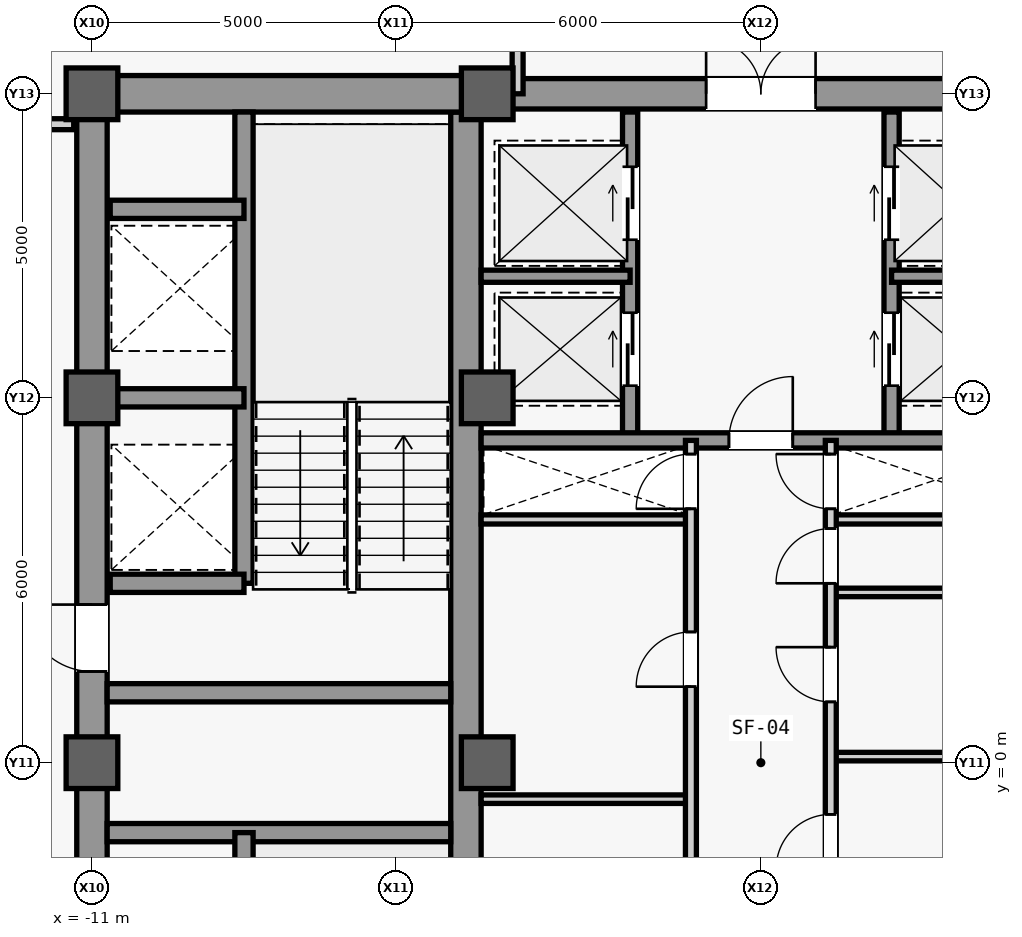
"""IFC4 building model, lengths in metres.
Left out: names, types, materials, properties, quantities, classifications, styles, units other than length and angle.
Written with IfcOpenShell. Run it as: python <this file> out.ifc"""

import sys

from ifc_helpers import new_model, si_unit, direction, frame, frame_2d, origin, origin_2d, place, context, subcontext, project, spatial, rectangle, extrude, source, transform, mapped, element, fill, save


model = new_model("IFC4")
c1 = context("Model", 3, precision=1e-05, world=origin(), true_north=direction((0.0, 1.0)))
c2 = subcontext(c1, "Body", "Model", "MODEL_VIEW")
j1 = project(units=[si_unit("LENGTHUNIT", "METRE"), si_unit("PLANEANGLEUNIT", "RADIAN")], contexts=[c1])
p1 = place(None, origin())
s1 = spatial("IfcSite", under=j1, at=p1, CompositionType="ELEMENT")
p2 = place(p1, origin())
s2 = spatial("IfcBuilding", under=s1, at=p2, CompositionType="ELEMENT")
p3 = place(p2, frame((0.0, 0.0, 247.1)))
s3 = spatial("IfcBuildingStorey", under=s2, at=p3, CompositionType="ELEMENT", Elevation=247.1)
m1 = source(origin(), c2, "Body", "SweptSolid", [
    extrude(rectangle(XDim=22.0, YDim=0.5, at=frame_2d((11.0, 0.0))), origin(), (0.0, 0.0, 1.0), 3.78),
])
p4 = place(p3, frame((-11.0, -11.0, 0.0), z_axis=(0.0, 0.0, 1.0), x_axis=(0.0, 1.0, 0.0)))
e1 = element("IfcWall", 1, at=p4, inside=s3, PredefinedType="SHEAR", context=c2, shape_type="MappedRepresentation", body=[
    mapped(m1, transform((0.0, 0.0, 0.0), scale=1.0)),
])
m2 = source(origin(), c2, "Body", "SweptSolid", [
    extrude(rectangle(XDim=1.1, YDim=2.2, at=frame_2d((0.55, 1.1))), frame((0.0, 0.26, 0.0), z_axis=(0.0, -1.0, 0.0), x_axis=(1.0, 0.0, 0.0)), (0.0, 0.0, 1.0), 0.52),
])
p5 = place(p4, frame((0.8, 0.0, 0.0)))
e2 = element("IfcOpeningElement", 2, at=p5, cuts=e1, PredefinedType="OPENING", context=c2, shape_type="MappedRepresentation", body=[
    mapped(m2, transform((0.0, 0.0, 0.0), scale=1.0)),
])
p6 = place(p4, frame((12.5, 0.0, 0.0)))
e3 = element("IfcOpeningElement", 3, at=p6, cuts=e1, PredefinedType="OPENING", context=c2, shape_type="MappedRepresentation", body=[
    mapped(m2, transform((0.0, 0.0, 0.0), scale=1.0)),
])
m3 = source(origin(), c2, "Body", "SweptSolid", [
    extrude(rectangle(XDim=0.9, YDim=2.15, at=frame_2d((0.45, 1.075))), frame((0.0, 0.26, 0.0), z_axis=(0.0, -1.0, 0.0), x_axis=(1.0, 0.0, 0.0)), (0.0, 0.0, 1.0), 0.52),
])
p7 = place(p4, frame((7.575, 0.0, 0.0)))
e4 = element("IfcOpeningElement", 4, at=p7, cuts=e1, PredefinedType="OPENING", context=c2, shape_type="MappedRepresentation", body=[
    mapped(m3, transform((0.0, 0.0, 0.0), scale=1.0)),
])
m4 = source(origin(), c2, "Body", "SweptSolid", [
    extrude(rectangle(XDim=1.3, YDim=2.3, at=frame_2d((0.65, 1.15))), frame((0.0, 0.26, 0.0), z_axis=(0.0, -1.0, 0.0), x_axis=(1.0, 0.0, 0.0)), (0.0, 0.0, 1.0), 0.52),
])
p8 = place(p4, frame((2.7, 0.0, 0.0)))
e5 = element("IfcOpeningElement", 5, at=p8, cuts=e1, PredefinedType="OPENING", context=c2, shape_type="MappedRepresentation", body=[
    mapped(m4, transform((0.0, 0.0, 0.0), scale=1.0)),
])
m5 = source(origin(), c2, "Body", "SweptSolid", [
    extrude(rectangle(XDim=21.4, YDim=0.5, at=frame_2d((10.7, 0.0))), origin(), (0.0, 0.0, 1.0), 3.78),
])
p9 = place(p3, frame((-4.85, -10.7, 0.0), z_axis=(0.0, 0.0, 1.0), x_axis=(0.0, 1.0, 0.0)))
e6 = element("IfcWall", 6, at=p9, inside=s3, PredefinedType="SHEAR", context=c2, shape_type="MappedRepresentation", body=[
    mapped(m5, transform((0.0, 0.0, 0.0), scale=1.0)),
])
m6 = source(origin(), c2, "Body", "SweptSolid", [
    extrude(rectangle(XDim=5.9, YDim=0.6, at=frame_2d((2.95, 0.0))), origin(), (0.0, 0.0, 1.0), 3.78),
])
p10 = place(p3, frame((-10.75, 11.0, 0.0), z_axis=(0.0, 0.0, 1.0), x_axis=(1.0, 0.0, 0.0)))
e7 = element("IfcWall", 7, at=p10, inside=s3, PredefinedType="SHEAR", context=c2, shape_type="MappedRepresentation", body=[
    mapped(m6, transform((0.0, 0.0, 0.0), scale=1.0)),
])
m7 = source(origin(), c2, "Body", "SweptSolid", [
    extrude(rectangle(XDim=5.65, YDim=0.3, at=frame_2d((2.825, 0.0))), origin(), (0.0, 0.0, 1.0), 3.78),
])
for number, where, z_axis, x_axis in (
    (8, (-10.75, -1.15, 0.0), (0.0, 0.0, 1.0), (1.0, 0.0, 0.0)),
    (9, (-10.75, 1.15, 0.0), (0.0, 0.0, 1.0), (1.0, 0.0, 0.0)),
):
    element("IfcWall", number, at=place(p3, frame(where, z_axis=z_axis, x_axis=x_axis)), inside=s3, PredefinedType="SHEAR", context=c2, shape_type="MappedRepresentation", body=[
        mapped(m7, transform((0.0, 0.0, 0.0), scale=1.0)),
    ])
m8 = source(origin(), c2, "Body", "SweptSolid", [
    extrude(rectangle(XDim=9.2, YDim=0.5, at=frame_2d((4.6, 0.0))), origin(), (0.0, 0.0, 1.0), 3.78),
])
p11 = place(p3, frame((-4.6, 11.0, 0.0), z_axis=(0.0, 0.0, 1.0), x_axis=(1.0, 0.0, 0.0)))
e10 = element("IfcWall", 10, at=p11, inside=s3, PredefinedType="SHEAR", context=c2, shape_type="MappedRepresentation", body=[
    mapped(m8, transform((0.0, 0.0, 0.0), scale=1.0)),
])
m9 = source(origin(), c2, "Body", "SweptSolid", [
    extrude(rectangle(XDim=1.8, YDim=2.25, at=frame_2d((0.9, 1.125))), frame((0.0, 0.26, 0.0), z_axis=(0.0, -1.0, 0.0), x_axis=(1.0, 0.0, 0.0)), (0.0, 0.0, 1.0), 0.52),
])
p12 = place(p11, frame((3.7, 0.0, 0.0)))
e11 = element("IfcOpeningElement", 11, at=p12, cuts=e10, PredefinedType="OPENING", context=c2, shape_type="MappedRepresentation", body=[
    mapped(m9, transform((0.0, 0.0, 0.0), scale=1.0)),
])
m10 = source(origin(), c2, "Body", "SweptSolid", [
    extrude(rectangle(XDim=0.85, YDim=0.85, at=origin_2d()), origin(), (0.0, 0.0, 1.0), 4.0),
])
for number, where, z_axis, x_axis in (
    (12, (-11.0, 0.0, 0.0), (0.0, 0.0, 1.0), (1.0, 0.0, 0.0)),
    (13, (-11.0, 6.0, 0.0), (0.0, 0.0, 1.0), (1.0, 0.0, 0.0)),
    (14, (-11.0, 11.0, 0.0), (0.0, 0.0, 1.0), (1.0, 0.0, 0.0)),
    (15, (-4.5, 0.0, 0.0), (0.0, 0.0, 1.0), (1.0, 0.0, 0.0)),
    (16, (-4.5, 6.0, 0.0), (0.0, 0.0, 1.0), (1.0, 0.0, 0.0)),
    (17, (-4.5, 11.0, 0.0), (0.0, 0.0, 1.0), (1.0, 0.0, 0.0)),
):
    element("IfcColumn", number, at=place(p3, frame(where, z_axis=z_axis, x_axis=x_axis)), inside=s3, PredefinedType="COLUMN", context=c2, shape_type="MappedRepresentation", body=[
        mapped(m10, transform((0.0, 0.0, 0.0), scale=1.0)),
    ])
m11 = source(origin(), c2, "Body", "SweptSolid", [
    extrude(rectangle(XDim=7.8, YDim=0.3, at=frame_2d((3.9, 0.0))), origin(), (0.0, 0.0, 1.0), 3.78),
])
p13 = place(p3, frame((-8.5, -8.95, 0.0), z_axis=(0.0, 0.0, 1.0), x_axis=(0.0, 1.0, 0.0)))
e18 = element("IfcWall", 18, at=p13, inside=s3, PredefinedType="SHEAR", context=c2, shape_type="MappedRepresentation", body=[
    mapped(m11, transform((0.0, 0.0, 0.0), scale=1.0)),
])
m12 = source(origin(), c2, "Body", "SweptSolid", [
    extrude(rectangle(XDim=7.75, YDim=0.3, at=frame_2d((3.875, 0.0))), origin(), (0.0, 0.0, 1.0), 3.78),
])
p14 = place(p3, frame((-8.5, 2.95, 0.0), z_axis=(0.0, 0.0, 1.0), x_axis=(0.0, 1.0, 0.0)))
e19 = element("IfcWall", 19, at=p14, inside=s3, PredefinedType="SHEAR", context=c2, shape_type="MappedRepresentation", body=[
    mapped(m12, transform((0.0, 0.0, 0.0), scale=1.0)),
])
m13 = source(origin(), c2, "Body", "SweptSolid", [
    extrude(rectangle(XDim=2.2, YDim=0.3, at=frame_2d((1.1, 0.0))), origin(), (0.0, 0.0, 1.0), 3.78),
])
for number, where, z_axis, x_axis in (
    (20, (-10.7, 2.95, 0.0), (0.0, 0.0, 1.0), (1.0, 0.0, 0.0)),
    (21, (-10.7, 6.0, 0.0), (0.0, 0.0, 1.0), (1.0, 0.0, 0.0)),
    (22, (-10.7, 9.1, 0.0), (0.0, 0.0, 1.0), (1.0, 0.0, 0.0)),
):
    element("IfcWall", number, at=place(p3, frame(where, z_axis=z_axis, x_axis=x_axis)), inside=s3, PredefinedType="SHEAR", context=c2, shape_type="MappedRepresentation", body=[
        mapped(m13, transform((0.0, 0.0, 0.0), scale=1.0)),
    ])
m14 = source(origin(), c2, "Body", "SweptSolid", [
    extrude(rectangle(XDim=4.05, YDim=0.18, at=frame_2d((2.025, 0.0))), origin(), (0.0, 0.0, 1.0), 3.78),
])
p15 = place(p3, frame((-15.35, 10.5, 0.0), z_axis=(0.0, 0.0, 1.0), x_axis=(1.0, 0.0, 0.0)))
e23 = element("IfcWall", 23, at=p15, inside=s3, PredefinedType="PARTITIONING", context=c2, shape_type="MappedRepresentation", body=[
    mapped(m14, transform((0.0, 0.0, 0.0), scale=1.0)),
])
m15 = source(origin(), c2, "Body", "SweptSolid", [
    extrude(rectangle(XDim=3.45, YDim=0.15, at=frame_2d((1.725, 0.0))), origin(), (0.0, 0.0, 1.0), 3.78),
])
for number, where, z_axis, x_axis in (
    (24, (-4.6, 4.0, 0.0), (0.0, 0.0, 1.0), (1.0, 0.0, 0.0)),
    (25, (1.15, 4.0, 0.0), (0.0, 0.0, 1.0), (1.0, 0.0, 0.0)),
):
    element("IfcWall", number, at=place(p3, frame(where, z_axis=z_axis, x_axis=x_axis)), inside=s3, PredefinedType="PARTITIONING", context=c2, shape_type="MappedRepresentation", body=[
        mapped(m15, transform((0.0, 0.0, 0.0), scale=1.0)),
    ])
m16 = source(origin(), c2, "Body", "SweptSolid", [
    extrude(rectangle(XDim=5.4, YDim=0.25, at=frame_2d((2.7, 0.0))), origin(), (0.0, 0.0, 1.0), 3.78),
])
p16 = place(p3, frame((-2.15, 5.3, 0.0), z_axis=(0.0, 0.0, 1.0), x_axis=(0.0, 1.0, 0.0)))
e26 = element("IfcWall", 26, at=p16, inside=s3, PredefinedType="SHEAR", context=c2, shape_type="MappedRepresentation", body=[
    mapped(m16, transform((0.0, 0.0, 0.0), scale=1.0)),
])
m17 = source(origin(), c2, "Body", "SweptSolid", [
    extrude(rectangle(XDim=1.2, YDim=2.3, at=frame_2d((0.6, 1.15))), frame((0.0, 0.135, 0.0), z_axis=(0.0, -1.0, 0.0), x_axis=(1.0, 0.0, 0.0)), (0.0, 0.0, 1.0), 0.27),
])
p17 = place(p16, frame((3.3, 0.0, 0.0)))
e27 = element("IfcOpeningElement", 27, at=p17, cuts=e26, PredefinedType="OPENING", context=c2, shape_type="MappedRepresentation", body=[
    mapped(m17, transform((0.0, 0.0, 0.0), scale=1.0)),
])
p18 = place(p16, frame((0.9, 0.0, 0.0)))
e28 = element("IfcOpeningElement", 28, at=p18, cuts=e26, PredefinedType="OPENING", context=c2, shape_type="MappedRepresentation", body=[
    mapped(m17, transform((0.0, 0.0, 0.0), scale=1.0)),
])
p19 = place(p3, frame((2.15, 5.3, 0.0), z_axis=(0.0, 0.0, 1.0), x_axis=(0.0, 1.0, 0.0)))
e29 = element("IfcWall", 29, at=p19, inside=s3, PredefinedType="SHEAR", context=c2, shape_type="MappedRepresentation", body=[
    mapped(m16, transform((0.0, 0.0, 0.0), scale=1.0)),
])
p20 = place(p19, frame((3.3, 0.0, 0.0)))
e30 = element("IfcOpeningElement", 30, at=p20, cuts=e29, PredefinedType="OPENING", context=c2, shape_type="MappedRepresentation", body=[
    mapped(m17, transform((0.0, 0.0, 0.0), scale=1.0)),
])
p21 = place(p19, frame((0.9, 0.0, 0.0)))
e31 = element("IfcOpeningElement", 31, at=p21, cuts=e29, PredefinedType="OPENING", context=c2, shape_type="MappedRepresentation", body=[
    mapped(m17, transform((0.0, 0.0, 0.0), scale=1.0)),
])
m18 = source(origin(), c2, "Body", "SweptSolid", [
    extrude(rectangle(XDim=2.45, YDim=0.2, at=frame_2d((1.225, 0.0))), origin(), (0.0, 0.0, 1.0), 3.78),
])
for number, where, z_axis, x_axis in (
    (32, (-4.6, 8.0, 0.0), (0.0, 0.0, 1.0), (1.0, 0.0, 0.0)),
    (33, (2.15, 8.0, 0.0), (0.0, 0.0, 1.0), (1.0, 0.0, 0.0)),
):
    element("IfcWall", number, at=place(p3, frame(where, z_axis=z_axis, x_axis=x_axis)), inside=s3, PredefinedType="SHEAR", context=c2, shape_type="MappedRepresentation", body=[
        mapped(m18, transform((0.0, 0.0, 0.0), scale=1.0)),
    ])
m19 = source(origin(), c2, "Body", "SweptSolid", [
    extrude(rectangle(XDim=9.2, YDim=0.25, at=frame_2d((4.6, 0.0))), origin(), (0.0, 0.0, 1.0), 3.78),
])
p22 = place(p3, frame((-4.6, 5.3, 0.0), z_axis=(0.0, 0.0, 1.0), x_axis=(1.0, 0.0, 0.0)))
e34 = element("IfcWall", 34, at=p22, inside=s3, PredefinedType="SHEAR", context=c2, shape_type="MappedRepresentation", body=[
    mapped(m19, transform((0.0, 0.0, 0.0), scale=1.0)),
])
m20 = source(origin(), c2, "Body", "SweptSolid", [
    extrude(rectangle(XDim=1.05, YDim=2.2, at=frame_2d((0.525, 1.1))), frame((0.0, 0.135, 0.0), z_axis=(0.0, -1.0, 0.0), x_axis=(1.0, 0.0, 0.0)), (0.0, 0.0, 1.0), 0.27),
])
p23 = place(p22, frame((4.075, 0.0, 0.0)))
e35 = element("IfcOpeningElement", 35, at=p23, cuts=e34, PredefinedType="OPENING", context=c2, shape_type="MappedRepresentation", body=[
    mapped(m20, transform((0.0, 0.0, 0.0), scale=1.0)),
])
m21 = source(origin(), c2, "Body", "SweptSolid", [
    extrude(rectangle(XDim=3.45, YDim=0.14, at=frame_2d((1.725, 0.0))), origin(), (0.0, 0.0, 1.0), 3.78),
])
p24 = place(p3, frame((-4.6, -0.6, 0.0), z_axis=(0.0, 0.0, 1.0), x_axis=(1.0, 0.0, 0.0)))
e36 = element("IfcWall", 36, at=p24, inside=s3, PredefinedType="PARTITIONING", context=c2, shape_type="MappedRepresentation", body=[
    mapped(m21, transform((0.0, 0.0, 0.0), scale=1.0)),
])
m22 = source(origin(), c2, "Body", "SweptSolid", [
    extrude(rectangle(XDim=10.6, YDim=0.18, at=frame_2d((5.3, 0.0))), origin(), (0.0, 0.0, 1.0), 3.78),
])
p25 = place(p3, frame((-1.15, -5.3, 0.0), z_axis=(0.0, 0.0, 1.0), x_axis=(0.0, 1.0, 0.0)))
e37 = element("IfcWall", 37, at=p25, inside=s3, PredefinedType="PARTITIONING", context=c2, shape_type="MappedRepresentation", body=[
    mapped(m22, transform((0.0, 0.0, 0.0), scale=1.0)),
])
m23 = source(origin(), c2, "Body", "SweptSolid", [
    extrude(rectangle(XDim=0.9, YDim=2.15, at=frame_2d((0.45, 1.075))), frame((0.0, 0.1, 0.0), z_axis=(0.0, -1.0, 0.0), x_axis=(1.0, 0.0, 0.0)), (0.0, 0.0, 1.0), 0.2),
])
p26 = place(p25, frame((1.9, 0.0, 0.0)))
e38 = element("IfcOpeningElement", 38, at=p26, cuts=e37, PredefinedType="OPENING", context=c2, shape_type="MappedRepresentation", body=[
    mapped(m23, transform((0.0, 0.0, 0.0), scale=1.0)),
])
p27 = place(p25, frame((6.55, 0.0, 0.0)))
e39 = element("IfcOpeningElement", 39, at=p27, cuts=e37, PredefinedType="OPENING", context=c2, shape_type="MappedRepresentation", body=[
    mapped(m23, transform((0.0, 0.0, 0.0), scale=1.0)),
])
p28 = place(p25, frame((9.475, 0.0, 0.0)))
e40 = element("IfcOpeningElement", 40, at=p28, cuts=e37, PredefinedType="OPENING", context=c2, shape_type="MappedRepresentation", body=[
    mapped(m23, transform((0.0, 0.0, 0.0), scale=1.0)),
])
m24 = source(origin(), c2, "Body", "SweptSolid", [
    extrude(rectangle(XDim=3.45, YDim=0.14, at=frame_2d((1.725, 0.0))), origin(), (0.0, 0.0, 1.0), 3.085),
])
p29 = place(p3, frame((1.15, 0.1, 0.0), z_axis=(0.0, 0.0, 1.0), x_axis=(1.0, 0.0, 0.0)))
e41 = element("IfcWall", 41, at=p29, inside=s3, PredefinedType="PARTITIONING", context=c2, shape_type="MappedRepresentation", body=[
    mapped(m24, transform((0.0, 0.0, 0.0), scale=1.0)),
])
p30 = place(p3, frame((1.15, 2.8, 0.0), z_axis=(0.0, 0.0, 1.0), x_axis=(1.0, 0.0, 0.0)))
e42 = element("IfcWall", 42, at=p30, inside=s3, PredefinedType="PARTITIONING", context=c2, shape_type="MappedRepresentation", body=[
    mapped(m21, transform((0.0, 0.0, 0.0), scale=1.0)),
])
p31 = place(p3, frame((1.15, -5.3, 0.0), z_axis=(0.0, 0.0, 1.0), x_axis=(0.0, 1.0, 0.0)))
e43 = element("IfcWall", 43, at=p31, inside=s3, PredefinedType="PARTITIONING", context=c2, shape_type="MappedRepresentation", body=[
    mapped(m22, transform((0.0, 0.0, 0.0), scale=1.0)),
])
p32 = place(p31, frame((0.85, 0.0, 0.0)))
e44 = element("IfcOpeningElement", 44, at=p32, cuts=e43, PredefinedType="OPENING", context=c2, shape_type="MappedRepresentation", body=[
    mapped(m23, transform((0.0, 0.0, 0.0), scale=1.0)),
])
p33 = place(p31, frame((3.55, 0.0, 0.0)))
e45 = element("IfcOpeningElement", 45, at=p33, cuts=e43, PredefinedType="OPENING", context=c2, shape_type="MappedRepresentation", body=[
    mapped(m23, transform((0.0, 0.0, 0.0), scale=1.0)),
])
p34 = place(p31, frame((6.3, 0.0, 0.0)))
e46 = element("IfcOpeningElement", 46, at=p34, cuts=e43, PredefinedType="OPENING", context=c2, shape_type="MappedRepresentation", body=[
    mapped(m23, transform((0.0, 0.0, 0.0), scale=1.0)),
])
p35 = place(p31, frame((8.25, 0.0, 0.0)))
e47 = element("IfcOpeningElement", 47, at=p35, cuts=e43, PredefinedType="OPENING", context=c2, shape_type="MappedRepresentation", body=[
    mapped(m23, transform((0.0, 0.0, 0.0), scale=1.0)),
])
p36 = place(p31, frame((9.475, 0.0, 0.0)))
e48 = element("IfcOpeningElement", 48, at=p36, cuts=e43, PredefinedType="OPENING", context=c2, shape_type="MappedRepresentation", body=[
    mapped(m23, transform((0.0, 0.0, 0.0), scale=1.0)),
])
m25 = source(origin(), c2, "Body", "SweptSolid", [
    extrude(rectangle(XDim=3.1, YDim=0.18, at=frame_2d((1.55, 0.0))), origin(), (0.0, 0.0, 1.0), 3.78),
])
p37 = place(p3, frame((-4.0, 11.0, 0.0), z_axis=(0.0, 0.0, 1.0), x_axis=(0.0, 1.0, 0.0)))
e49 = element("IfcWall", 49, at=p37, inside=s3, PredefinedType="PARTITIONING", context=c2, shape_type="MappedRepresentation", body=[
    mapped(m25, transform((0.0, 0.0, 0.0), scale=1.0)),
])
m26 = source(origin(), c2, "Body", "SweptSolid", [
    extrude(rectangle(XDim=1.1, YDim=2.2, at=frame_2d((0.55, 1.1))), frame((0.0, 0.025, 0.0), z_axis=(0.0, -1.0, 0.0), x_axis=(1.0, 0.0, 0.0)), (0.0, 0.0, 1.0), 0.05),
])
p38 = place(p6, origin())
e50 = element("IfcDoor", 50, at=p38, inside=s3, OperationType="SINGLE_SWING_RIGHT", PredefinedType="DOOR", context=c2, shape_type="MappedRepresentation", body=[
    mapped(m26, transform((0.0, 0.0, 0.0), scale=1.0)),
])
fill(e3, e50)
m27 = source(origin(), c2, "Body", "SweptSolid", [
    extrude(rectangle(XDim=1.05, YDim=2.2, at=frame_2d((0.525, 1.1))), frame((0.0, 0.025, 0.0), z_axis=(0.0, -1.0, 0.0), x_axis=(1.0, 0.0, 0.0)), (0.0, 0.0, 1.0), 0.05),
])
p39 = place(p23, origin())
e51 = element("IfcDoor", 51, at=p39, inside=s3, OperationType="SINGLE_SWING_RIGHT", PredefinedType="DOOR", context=c2, shape_type="MappedRepresentation", body=[
    mapped(m27, transform((0.0, 0.0, 0.0), scale=1.0)),
])
fill(e35, e51)
m28 = source(origin(), c2, "Body", "SweptSolid", [
    extrude(rectangle(XDim=1.8, YDim=2.25, at=frame_2d((0.9, 1.125))), frame((0.0, 0.025, 0.0), z_axis=(0.0, -1.0, 0.0), x_axis=(1.0, 0.0, 0.0)), (0.0, 0.0, 1.0), 0.05),
])
p40 = place(p12, origin())
e52 = element("IfcDoor", 52, at=p40, inside=s3, OperationType="SINGLE_SWING_RIGHT", PredefinedType="DOOR", context=c2, shape_type="MappedRepresentation", body=[
    mapped(m28, transform((0.0, 0.0, 0.0), scale=1.0)),
])
fill(e11, e52)
m29 = source(origin(), c2, "Body", "SweptSolid", [
    extrude(rectangle(XDim=0.9, YDim=2.15, at=frame_2d((0.45, 1.075))), frame((0.0, 0.025, 0.0), z_axis=(0.0, -1.0, 0.0), x_axis=(1.0, 0.0, 0.0)), (0.0, 0.0, 1.0), 0.05),
])
p41 = place(p27, origin())
e53 = element("IfcDoor", 53, at=p41, inside=s3, OperationType="SINGLE_SWING_LEFT", PredefinedType="DOOR", context=c2, shape_type="MappedRepresentation", body=[
    mapped(m29, transform((0.0, 0.0, 0.0), scale=1.0)),
])
fill(e39, e53)
p42 = place(p33, origin())
e54 = element("IfcDoor", 54, at=p42, inside=s3, OperationType="SINGLE_SWING_LEFT", PredefinedType="DOOR", context=c2, shape_type="MappedRepresentation", body=[
    mapped(m29, transform((0.0, 0.0, 0.0), scale=1.0)),
])
fill(e45, e54)
p43 = place(p34, origin())
e55 = element("IfcDoor", 55, at=p43, inside=s3, OperationType="SINGLE_SWING_RIGHT", PredefinedType="DOOR", context=c2, shape_type="MappedRepresentation", body=[
    mapped(m29, transform((0.0, 0.0, 0.0), scale=1.0)),
])
fill(e46, e55)
p44 = place(p35, origin())
e56 = element("IfcDoor", 56, at=p44, inside=s3, OperationType="SINGLE_SWING_LEFT", PredefinedType="DOOR", context=c2, shape_type="MappedRepresentation", body=[
    mapped(m29, transform((0.0, 0.0, 0.0), scale=1.0)),
])
fill(e47, e56)
p45 = place(p28, origin())
e57 = element("IfcDoor", 57, at=p45, inside=s3, OperationType="SINGLE_SWING_LEFT", PredefinedType="DOOR", context=c2, shape_type="MappedRepresentation", body=[
    mapped(m29, transform((0.0, 0.0, 0.0), scale=1.0)),
])
fill(e40, e57)
p46 = place(p36, origin())
e58 = element("IfcDoor", 58, at=p46, inside=s3, OperationType="SINGLE_SWING_RIGHT", PredefinedType="DOOR", context=c2, shape_type="MappedRepresentation", body=[
    mapped(m29, transform((0.0, 0.0, 0.0), scale=1.0)),
])
fill(e48, e58)
m30 = source(origin(), c2, "Body", "SweptSolid", [
    extrude(rectangle(XDim=1.2, YDim=2.3, at=frame_2d((0.6, 1.15))), frame((0.0, 0.025, 0.0), z_axis=(0.0, -1.0, 0.0), x_axis=(1.0, 0.0, 0.0)), (0.0, 0.0, 1.0), 0.05),
])
p47 = place(p17, origin())
e59 = element("IfcDoor", 59, at=p47, inside=s3, OperationType="SLIDING_TO_LEFT", PredefinedType="DOOR", context=c2, shape_type="MappedRepresentation", body=[
    mapped(m30, transform((0.0, 0.0, 0.0), scale=1.0)),
])
fill(e27, e59)
p48 = place(p20, origin())
e60 = element("IfcDoor", 60, at=p48, inside=s3, OperationType="SLIDING_TO_LEFT", PredefinedType="DOOR", context=c2, shape_type="MappedRepresentation", body=[
    mapped(m30, transform((0.0, 0.0, 0.0), scale=1.0)),
])
fill(e30, e60)
p49 = place(p18, origin())
e61 = element("IfcDoor", 61, at=p49, inside=s3, OperationType="SLIDING_TO_LEFT", PredefinedType="DOOR", context=c2, shape_type="MappedRepresentation", body=[
    mapped(m30, transform((0.0, 0.0, 0.0), scale=1.0)),
])
fill(e28, e61)
p50 = place(p21, origin())
e62 = element("IfcDoor", 62, at=p50, inside=s3, OperationType="SLIDING_TO_LEFT", PredefinedType="DOOR", context=c2, shape_type="MappedRepresentation", body=[
    mapped(m30, transform((0.0, 0.0, 0.0), scale=1.0)),
])
fill(e31, e62)
save(model, sys.argv[1])
